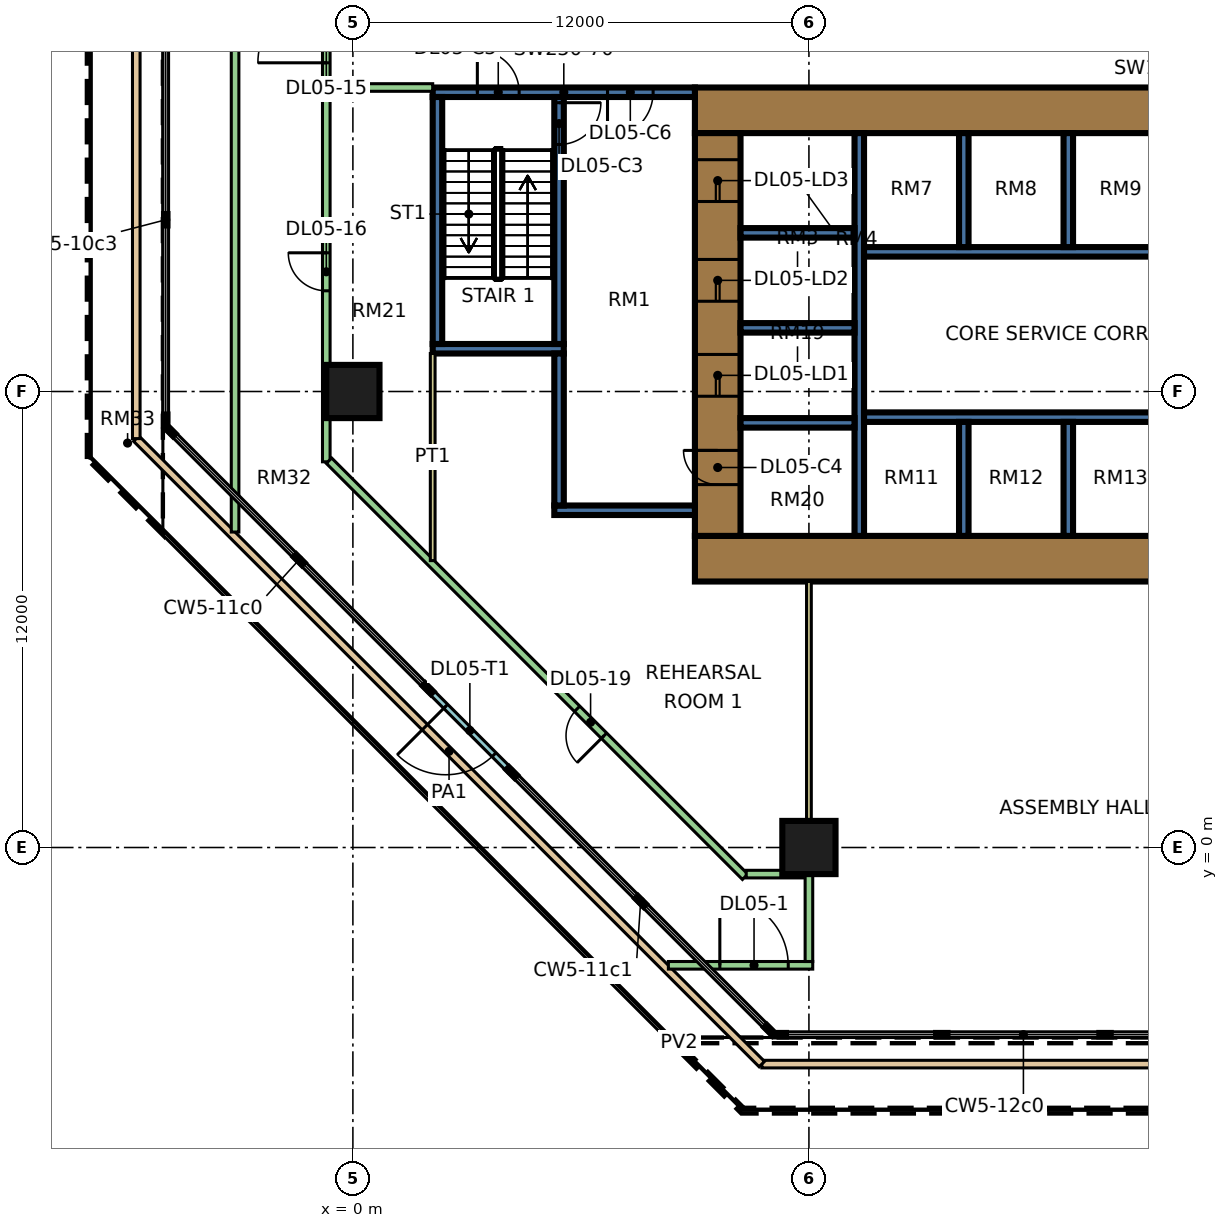
"""IFC4 building model, lengths in metres.
Left out: names, types, materials, properties, quantities, classifications, styles, units other than length and angle.
Written with IfcOpenShell. Run it as: python <this file> out.ifc"""

import sys

from ifc_helpers import new_model, si_unit, direction, frame, frame_2d, origin, origin_2d, place, context, subcontext, project, spatial, rectangle, extrude, element, fill, save


model = new_model("IFC4")
c1 = context("Model", 3, precision=1e-05, world=origin(), true_north=direction((0.0, 1.0)))
c2 = subcontext(c1, "Body", "Model", "MODEL_VIEW")
j1 = project(units=[si_unit("LENGTHUNIT", "METRE"), si_unit("PLANEANGLEUNIT", "RADIAN")], contexts=[c1])
p1 = place(None, origin())
s1 = spatial("IfcSite", under=j1, at=p1, CompositionType="ELEMENT")
p2 = place(p1, origin())
s2 = spatial("IfcBuilding", under=s1, at=p2, CompositionType="ELEMENT")
p3 = place(p2, frame((0.0, 0.0, 26.4)))
s3 = spatial("IfcBuildingStorey", under=s2, at=p3, CompositionType="ELEMENT", Elevation=26.4)
for number, where, z_axis, x_axis in (
    (1, (12.0, 0.0, 0.0), (0.0, 0.0, 1.0), (1.0, 0.0, 0.0)),
    (2, (0.0, 12.0, 0.0), (0.0, 0.0, 1.0), (1.0, 0.0, 0.0)),
):
    element("IfcColumn", number, at=place(p3, frame(where, z_axis=z_axis, x_axis=x_axis)), inside=s3, PredefinedType="COLUMN", context=c2, shape_type="SweptSolid", body=[
        extrude(rectangle(XDim=1.4, YDim=1.4, at=origin_2d()), origin(), (0.0, 0.0, 1.0), 9.0),
    ])
p4 = place(p3, frame((9.0, 7.6, 0.0), z_axis=(0.0, 0.0, 1.0), x_axis=(1.0, 0.0, 0.0)))
e3 = element("IfcWall", 3, at=p4, inside=s3, PredefinedType="SHEAR", context=c2, shape_type="SweptSolid", body=[
    extrude(rectangle(XDim=25.0, YDim=1.2, at=frame_2d((12.5, 0.0))), origin(), (0.0, 0.0, 1.0), 9.0),
])
p5 = place(p3, frame((9.0, 19.4, 0.0), z_axis=(0.0, 0.0, 1.0), x_axis=(1.0, 0.0, 0.0)))
e4 = element("IfcWall", 4, at=p5, inside=s3, PredefinedType="SHEAR", context=c2, shape_type="SweptSolid", body=[
    extrude(rectangle(XDim=25.0, YDim=1.2, at=frame_2d((12.5, 0.0))), origin(), (0.0, 0.0, 1.0), 9.0),
])
p6 = place(p5, frame((19.1, 0.0, 0.0)))
e5 = element("IfcOpeningElement", 5, at=p6, cuts=e4, PredefinedType="OPENING", context=c2, shape_type="SweptSolid", body=[
    extrude(rectangle(XDim=1.8, YDim=2.4, at=frame_2d((0.9, 1.2))), frame((0.0, 0.61, 0.0), z_axis=(0.0, -1.0, 0.0), x_axis=(1.0, 0.0, 0.0)), (0.0, 0.0, 1.0), 1.22),
])
p7 = place(p3, frame((9.6, 8.2, 0.0), z_axis=(0.0, 0.0, 1.0), x_axis=(0.0, 1.0, 0.0)))
e6 = element("IfcWall", 6, at=p7, inside=s3, PredefinedType="SHEAR", context=c2, shape_type="SweptSolid", body=[
    extrude(rectangle(XDim=10.6, YDim=1.2, at=frame_2d((5.3, 0.0))), origin(), (0.0, 0.0, 1.0), 9.0),
])
p8 = place(p7, frame((3.675, 0.0, 0.0)))
e7 = element("IfcOpeningElement", 7, at=p8, cuts=e6, PredefinedType="OPENING", context=c2, shape_type="SweptSolid", body=[
    extrude(rectangle(XDim=1.1, YDim=2.2, at=frame_2d((0.55, 1.1))), frame((0.0, 0.61, 0.0), z_axis=(0.0, -1.0, 0.0), x_axis=(1.0, 0.0, 0.0)), (0.0, 0.0, 1.0), 1.22),
])
p9 = place(p7, frame((6.175, 0.0, 0.0)))
e8 = element("IfcOpeningElement", 8, at=p9, cuts=e6, PredefinedType="OPENING", context=c2, shape_type="SweptSolid", body=[
    extrude(rectangle(XDim=1.1, YDim=2.2, at=frame_2d((0.55, 1.1))), frame((0.0, 0.61, 0.0), z_axis=(0.0, -1.0, 0.0), x_axis=(1.0, 0.0, 0.0)), (0.0, 0.0, 1.0), 1.22),
])
p10 = place(p7, frame((8.8, 0.0, 0.0)))
e9 = element("IfcOpeningElement", 9, at=p10, cuts=e6, PredefinedType="OPENING", context=c2, shape_type="SweptSolid", body=[
    extrude(rectangle(XDim=1.1, YDim=2.2, at=frame_2d((0.55, 1.1))), frame((0.0, 0.61, 0.0), z_axis=(0.0, -1.0, 0.0), x_axis=(1.0, 0.0, 0.0)), (0.0, 0.0, 1.0), 1.22),
])
p11 = place(p7, frame((1.35, 0.0, 0.0)))
e10 = element("IfcOpeningElement", 10, at=p11, cuts=e6, PredefinedType="OPENING", context=c2, shape_type="SweptSolid", body=[
    extrude(rectangle(XDim=0.9, YDim=2.1, at=frame_2d((0.45, 1.05))), frame((0.0, 0.61, 0.0), z_axis=(0.0, -1.0, 0.0), x_axis=(1.0, 0.0, 0.0)), (0.0, 0.0, 1.0), 1.22),
])
p12 = place(p3, frame((13.325, 8.2, 0.0), z_axis=(0.0, 0.0, 1.0), x_axis=(0.0, 1.0, 0.0)))
e11 = element("IfcWall", 11, at=p12, inside=s3, PredefinedType="SHEAR", context=c2, shape_type="SweptSolid", body=[
    extrude(rectangle(XDim=10.6, YDim=0.25, at=frame_2d((5.3, 0.0))), origin(), (0.0, 0.0, 1.0), 9.0),
])
p13 = place(p3, frame((13.45, 11.325, 0.0), z_axis=(0.0, 0.0, 1.0), x_axis=(1.0, 0.0, 0.0)))
e12 = element("IfcWall", 12, at=p13, inside=s3, PredefinedType="SHEAR", context=c2, shape_type="SweptSolid", body=[
    extrude(rectangle(XDim=19.35, YDim=0.25, at=frame_2d((9.675, 0.0))), origin(), (0.0, 0.0, 1.0), 9.0),
])
p14 = place(p3, frame((13.45, 15.675, 0.0), z_axis=(0.0, 0.0, 1.0), x_axis=(1.0, 0.0, 0.0)))
e13 = element("IfcWall", 13, at=p14, inside=s3, PredefinedType="SHEAR", context=c2, shape_type="SweptSolid", body=[
    extrude(rectangle(XDim=13.75, YDim=0.25, at=frame_2d((6.875, 0.0))), origin(), (0.0, 0.0, 1.0), 9.0),
])
for number, where, z_axis, x_axis in (
    (14, (10.2, 11.175, 0.0), (0.0, 0.0, 1.0), (1.0, 0.0, 0.0)),
    (15, (10.2, 13.675, 0.0), (0.0, 0.0, 1.0), (1.0, 0.0, 0.0)),
    (16, (10.2, 16.175, 0.0), (0.0, 0.0, 1.0), (1.0, 0.0, 0.0)),
    (17, (16.075, 8.2, 0.0), (0.0, 0.0, 1.0), (0.0, 1.0, 0.0)),
    (18, (18.825, 8.2, 0.0), (0.0, 0.0, 1.0), (0.0, 1.0, 0.0)),
    (19, (16.075, 15.8, 0.0), (0.0, 0.0, 1.0), (0.0, 1.0, 0.0)),
    (20, (18.825, 15.8, 0.0), (0.0, 0.0, 1.0), (0.0, 1.0, 0.0)),
):
    element("IfcWall", number, at=place(p3, frame(where, z_axis=z_axis, x_axis=x_axis)), inside=s3, PredefinedType="SHEAR", context=c2, shape_type="SweptSolid", body=[
        extrude(rectangle(XDim=3.0, YDim=0.25, at=frame_2d((1.5, 0.0))), origin(), (0.0, 0.0, 1.0), 9.0),
    ])
p15 = place(p3, frame((2.1, 19.875, 0.0), z_axis=(0.0, 0.0, 1.0), x_axis=(1.0, 0.0, 0.0)))
e21 = element("IfcWall", 21, at=p15, inside=s3, PredefinedType="SHEAR", context=c2, shape_type="SweptSolid", body=[
    extrude(rectangle(XDim=6.9, YDim=0.25, at=frame_2d((3.45, 0.0))), origin(), (0.0, 0.0, 1.0), 9.0),
])
p16 = place(p15, frame((1.175, 0.0, 0.0)))
e22 = element("IfcOpeningElement", 22, at=p16, cuts=e21, PredefinedType="OPENING", context=c2, shape_type="SweptSolid", body=[
    extrude(rectangle(XDim=1.1, YDim=2.2, at=frame_2d((0.55, 1.1))), frame((0.0, 0.135, 0.0), z_axis=(0.0, -1.0, 0.0), x_axis=(1.0, 0.0, 0.0)), (0.0, 0.0, 1.0), 0.27),
])
p17 = place(p15, frame((4.6, 0.0, 0.0)))
e23 = element("IfcOpeningElement", 23, at=p17, cuts=e21, PredefinedType="OPENING", context=c2, shape_type="SweptSolid", body=[
    extrude(rectangle(XDim=1.2, YDim=2.2, at=frame_2d((0.6, 1.1))), frame((0.0, 0.135, 0.0), z_axis=(0.0, -1.0, 0.0), x_axis=(1.0, 0.0, 0.0)), (0.0, 0.0, 1.0), 0.27),
])
p18 = place(p3, frame((2.1, 13.125, 0.0), z_axis=(0.0, 0.0, 1.0), x_axis=(1.0, 0.0, 0.0)))
e24 = element("IfcWall", 24, at=p18, inside=s3, PredefinedType="SHEAR", context=c2, shape_type="SweptSolid", body=[
    extrude(rectangle(XDim=3.45, YDim=0.25, at=frame_2d((1.725, 0.0))), origin(), (0.0, 0.0, 1.0), 9.0),
])
p19 = place(p3, frame((2.225, 13.25, 0.0), z_axis=(0.0, 0.0, 1.0), x_axis=(0.0, 1.0, 0.0)))
e25 = element("IfcWall", 25, at=p19, inside=s3, PredefinedType="SHEAR", context=c2, shape_type="SweptSolid", body=[
    extrude(rectangle(XDim=6.5, YDim=0.25, at=frame_2d((3.25, 0.0))), origin(), (0.0, 0.0, 1.0), 9.0),
])
p20 = place(p3, frame((5.425, 13.25, 0.0), z_axis=(0.0, 0.0, 1.0), x_axis=(0.0, 1.0, 0.0)))
e26 = element("IfcWall", 26, at=p20, inside=s3, PredefinedType="SHEAR", context=c2, shape_type="SweptSolid", body=[
    extrude(rectangle(XDim=6.5, YDim=0.25, at=frame_2d((3.25, 0.0))), origin(), (0.0, 0.0, 1.0), 9.0),
])
p21 = place(p20, frame((5.25, 0.0, 0.0)))
e27 = element("IfcOpeningElement", 27, at=p21, cuts=e26, PredefinedType="OPENING", context=c2, shape_type="SweptSolid", body=[
    extrude(rectangle(XDim=1.1, YDim=2.2, at=frame_2d((0.55, 1.1))), frame((0.0, 0.135, 0.0), z_axis=(0.0, -1.0, 0.0), x_axis=(1.0, 0.0, 0.0)), (0.0, 0.0, 1.0), 0.27),
])
p22 = place(p3, frame((5.3, 8.875, 0.0), z_axis=(0.0, 0.0, 1.0), x_axis=(1.0, 0.0, 0.0)))
e28 = element("IfcWall", 28, at=p22, inside=s3, PredefinedType="SHEAR", context=c2, shape_type="SweptSolid", body=[
    extrude(rectangle(XDim=3.7, YDim=0.25, at=frame_2d((1.85, 0.0))), origin(), (0.0, 0.0, 1.0), 9.0),
])
p23 = place(p3, frame((5.425, 9.0, 0.0), z_axis=(0.0, 0.0, 1.0), x_axis=(0.0, 1.0, 0.0)))
e29 = element("IfcWall", 29, at=p23, inside=s3, PredefinedType="SHEAR", context=c2, shape_type="SweptSolid", body=[
    extrude(rectangle(XDim=4.0, YDim=0.25, at=frame_2d((2.0, 0.0))), origin(), (0.0, 0.0, 1.0), 9.0),
])
p24 = place(p3, frame((2.018, 4.139, 0.0), z_axis=(0.0, 0.0, 1.0), x_axis=(0.707106781187, -0.707106781187, 0.0)))
e30 = element("IfcWall", 30, at=p24, inside=s3, PredefinedType="SOLIDWALL", context=c2, shape_type="SweptSolid", body=[
    extrude(rectangle(XDim=3.0, YDim=0.15, at=frame_2d((1.5, 0.0))), origin(), (0.0, 0.0, 1.0), 8.45),
])
p25 = place(p24, frame((0.6, 0.0, 0.0)))
e31 = element("IfcOpeningElement", 31, at=p25, cuts=e30, PredefinedType="OPENING", context=c2, shape_type="SweptSolid", body=[
    extrude(rectangle(XDim=1.8, YDim=2.4, at=frame_2d((0.9, 1.2))), frame((0.0, 0.085, 0.0), z_axis=(0.0, -1.0, 0.0), x_axis=(1.0, 0.0, 0.0)), (0.0, 0.0, 1.0), 0.17),
])
p26 = place(p3, frame((72.24, -5.7, 0.0), z_axis=(0.0, 0.0, 1.0), x_axis=(-1.0, 0.0, 0.0)))
e32 = element("IfcWall", 32, at=p26, inside=s3, PredefinedType="PARAPET", context=c2, shape_type="SweptSolid", body=[
    extrude(rectangle(XDim=61.479, YDim=0.2, at=frame_2d((30.74, 0.0))), origin(), (0.0, 0.0, 1.0), 0.5),
])
p27 = place(p3, frame((10.76, -5.7, 0.0), z_axis=(0.0, 0.0, 1.0), x_axis=(-0.707106781187, 0.707106781187, 0.0)))
e33 = element("IfcWall", 33, at=p27, inside=s3, PredefinedType="PARAPET", context=c2, shape_type="SweptSolid", body=[
    extrude(rectangle(XDim=23.278, YDim=0.2, at=frame_2d((11.639, 0.0))), origin(), (0.0, 0.0, 1.0), 0.5),
])
p28 = place(p3, frame((-5.7, 10.76, 0.0), z_axis=(0.0, 0.0, 1.0), x_axis=(0.0, 1.0, 0.0)))
e34 = element("IfcWall", 34, at=p28, inside=s3, PredefinedType="PARAPET", context=c2, shape_type="SweptSolid", body=[
    extrude(rectangle(XDim=52.479, YDim=0.2, at=frame_2d((26.24, 0.0))), origin(), (0.0, 0.0, 1.0), 0.5),
])
p29 = place(p3, frame((-3.1, 8.302, 0.0), z_axis=(0.0, 0.0, 1.0), x_axis=(0.0, 1.0, 0.0)))
e35 = element("IfcWall", 35, at=p29, inside=s3, PredefinedType="PARTITIONING", context=c2, shape_type="SweptSolid", body=[
    extrude(rectangle(XDim=56.331, YDim=0.2, at=frame_2d((28.166, 0.0))), origin(), (0.0, 0.0, 1.0), 8.45),
])
p30 = place(p29, frame((29.431, 0.0, 0.0)))
e36 = element("IfcOpeningElement", 36, at=p30, cuts=e35, PredefinedType="OPENING", context=c2, shape_type="SweptSolid", body=[
    extrude(rectangle(XDim=1.0, YDim=2.1, at=frame_2d((0.5, 1.05))), frame((0.0, 0.11, 0.0), z_axis=(0.0, -1.0, 0.0), x_axis=(1.0, 0.0, 0.0)), (0.0, 0.0, 1.0), 0.22),
])
p31 = place(p29, frame((55.181, 0.0, 0.0)))
e37 = element("IfcOpeningElement", 37, at=p31, cuts=e35, PredefinedType="OPENING", context=c2, shape_type="SweptSolid", body=[
    extrude(rectangle(XDim=1.0, YDim=2.1, at=frame_2d((0.5, 1.05))), frame((0.0, 0.11, 0.0), z_axis=(0.0, -1.0, 0.0), x_axis=(1.0, 0.0, 0.0)), (0.0, 0.0, 1.0), 0.22),
])
p32 = place(p3, frame((-0.7, 10.15, 0.0), z_axis=(0.0, 0.0, 1.0), x_axis=(0.0, 1.0, 0.0)))
e38 = element("IfcWall", 38, at=p32, inside=s3, PredefinedType="PARTITIONING", context=c2, shape_type="SweptSolid", body=[
    extrude(rectangle(XDim=15.85, YDim=0.2, at=frame_2d((7.925, 0.0))), origin(), (0.0, 0.0, 1.0), 8.45),
])
p33 = place(p32, frame((10.5, 0.0, 0.0)))
e39 = element("IfcOpeningElement", 39, at=p33, cuts=e38, PredefinedType="OPENING", context=c2, shape_type="SweptSolid", body=[
    extrude(rectangle(XDim=1.8, YDim=2.1, at=frame_2d((0.9, 1.05))), frame((0.0, 0.11, 0.0), z_axis=(0.0, -1.0, 0.0), x_axis=(1.0, 0.0, 0.0)), (0.0, 0.0, 1.0), 0.22),
])
p34 = place(p32, frame((4.5, 0.0, 0.0)))
e40 = element("IfcOpeningElement", 40, at=p34, cuts=e38, PredefinedType="OPENING", context=c2, shape_type="SweptSolid", body=[
    extrude(rectangle(XDim=1.0, YDim=2.1, at=frame_2d((0.5, 1.05))), frame((0.0, 0.11, 0.0), z_axis=(0.0, -1.0, 0.0), x_axis=(1.0, 0.0, 0.0)), (0.0, 0.0, 1.0), 0.22),
])
p35 = place(p3, frame((-0.629, 10.179, 0.0), z_axis=(0.0, 0.0, 1.0), x_axis=(0.707106781187, -0.707106781187, 0.0)))
e41 = element("IfcWall", 41, at=p35, inside=s3, PredefinedType="PARTITIONING", context=c2, shape_type="SweptSolid", body=[
    extrude(rectangle(XDim=15.486, YDim=0.2, at=frame_2d((7.743, 0.0))), origin(), (0.0, 0.0, 1.0), 8.45),
])
p36 = place(p35, frame((9.235, 0.0, 0.0)))
e42 = element("IfcOpeningElement", 42, at=p36, cuts=e41, PredefinedType="OPENING", context=c2, shape_type="SweptSolid", body=[
    extrude(rectangle(XDim=1.0, YDim=2.1, at=frame_2d((0.5, 1.05))), frame((0.0, 0.11, 0.0), z_axis=(0.0, -1.0, 0.0), x_axis=(1.0, 0.0, 0.0)), (0.0, 0.0, 1.0), 0.22),
])
p37 = place(p3, frame((-0.6, 20.0, 0.0), z_axis=(0.0, 0.0, 1.0), x_axis=(1.0, 0.0, 0.0)))
e43 = element("IfcWall", 43, at=p37, inside=s3, PredefinedType="PARTITIONING", context=c2, shape_type="SweptSolid", body=[
    extrude(rectangle(XDim=2.7, YDim=0.2, at=frame_2d((1.35, 0.0))), origin(), (0.0, 0.0, 1.0), 8.45),
])
p38 = place(p3, frame((2.1, 7.55, 0.0), z_axis=(0.0, 0.0, 1.0), x_axis=(0.0, 1.0, 0.0)))
e44 = element("IfcWall", 44, at=p38, inside=s3, PredefinedType="PARTITIONING", context=c2, shape_type="SweptSolid", body=[
    extrude(rectangle(XDim=5.45, YDim=0.125, at=frame_2d((2.725, 0.0))), origin(), (0.0, 0.0, 1.0), 8.45),
])
p39 = place(p3, frame((8.302, -3.1, 0.0), z_axis=(0.0, 0.0, 1.0), x_axis=(1.0, 0.0, 0.0)))
e45 = element("IfcWall", 45, at=p39, inside=s3, PredefinedType="PARTITIONING", context=c2, shape_type="SweptSolid", body=[
    extrude(rectangle(XDim=3.798, YDim=0.2, at=frame_2d((1.899, 0.0))), origin(), (0.0, 0.0, 1.0), 8.45),
])
p40 = place(p39, frame((1.354, 0.0, 0.0)))
e46 = element("IfcOpeningElement", 46, at=p40, cuts=e45, PredefinedType="OPENING", context=c2, shape_type="SweptSolid", body=[
    extrude(rectangle(XDim=1.8, YDim=2.1, at=frame_2d((0.9, 1.05))), frame((0.0, 0.11, 0.0), z_axis=(0.0, -1.0, 0.0), x_axis=(1.0, 0.0, 0.0)), (0.0, 0.0, 1.0), 0.22),
])
p41 = place(p3, frame((10.35, -0.7, 0.0), z_axis=(0.0, 0.0, 1.0), x_axis=(1.0, 0.0, 0.0)))
e47 = element("IfcWall", 47, at=p41, inside=s3, PredefinedType="PARTITIONING", context=c2, shape_type="SweptSolid", body=[
    extrude(rectangle(XDim=1.55, YDim=0.2, at=frame_2d((0.775, 0.0))), origin(), (0.0, 0.0, 1.0), 8.45),
])
p42 = place(p3, frame((12.0, -3.0, 0.0), z_axis=(0.0, 0.0, 1.0), x_axis=(0.0, 1.0, 0.0)))
e48 = element("IfcWall", 48, at=p42, inside=s3, PredefinedType="PARTITIONING", context=c2, shape_type="SweptSolid", body=[
    extrude(rectangle(XDim=2.3, YDim=0.2, at=frame_2d((1.15, 0.0))), origin(), (0.0, 0.0, 1.0), 8.45),
])
p43 = place(p3, frame((12.0, -0.7, 0.0), z_axis=(0.0, 0.0, 1.0), x_axis=(0.0, 1.0, 0.0)))
e49 = element("IfcWall", 49, at=p43, inside=s3, PredefinedType="PARTITIONING", context=c2, shape_type="SweptSolid", body=[
    extrude(rectangle(XDim=7.7, YDim=0.125, at=frame_2d((3.85, 0.0))), origin(), (0.0, 0.0, 1.0), 8.45),
])
p44 = place(p25, frame((1.8, 0.0, 0.0), z_axis=(0.0, 0.0, 1.0), x_axis=(-1.0, 0.0, 0.0)))
e50 = element("IfcDoor", 50, at=p44, inside=s3, OperationType="DOUBLE_DOOR_SINGLE_SWING", PredefinedType="DOOR", context=c2, shape_type="SweptSolid", body=[
    extrude(rectangle(XDim=1.8, YDim=2.4, at=frame_2d((0.9, 1.2))), frame((0.0, 0.025, 0.0), z_axis=(0.0, -1.0, 0.0), x_axis=(1.0, 0.0, 0.0)), (0.0, 0.0, 1.0), 0.05),
])
fill(e31, e50)
p45 = place(p8, origin())
e51 = element("IfcDoor", 51, at=p45, inside=s3, OperationType="DOUBLE_DOOR_SLIDING", PredefinedType="DOOR", context=c2, shape_type="SweptSolid", body=[
    extrude(rectangle(XDim=1.1, YDim=2.2, at=frame_2d((0.55, 1.1))), frame((0.0, 0.025, 0.0), z_axis=(0.0, -1.0, 0.0), x_axis=(1.0, 0.0, 0.0)), (0.0, 0.0, 1.0), 0.05),
])
fill(e7, e51)
p46 = place(p9, origin())
e52 = element("IfcDoor", 52, at=p46, inside=s3, OperationType="DOUBLE_DOOR_SLIDING", PredefinedType="DOOR", context=c2, shape_type="SweptSolid", body=[
    extrude(rectangle(XDim=1.1, YDim=2.2, at=frame_2d((0.55, 1.1))), frame((0.0, 0.025, 0.0), z_axis=(0.0, -1.0, 0.0), x_axis=(1.0, 0.0, 0.0)), (0.0, 0.0, 1.0), 0.05),
])
fill(e8, e52)
p47 = place(p10, origin())
e53 = element("IfcDoor", 53, at=p47, inside=s3, OperationType="DOUBLE_DOOR_SLIDING", PredefinedType="DOOR", context=c2, shape_type="SweptSolid", body=[
    extrude(rectangle(XDim=1.1, YDim=2.2, at=frame_2d((0.55, 1.1))), frame((0.0, 0.025, 0.0), z_axis=(0.0, -1.0, 0.0), x_axis=(1.0, 0.0, 0.0)), (0.0, 0.0, 1.0), 0.05),
])
fill(e9, e53)
p48 = place(p21, origin())
e54 = element("IfcDoor", 54, at=p48, inside=s3, OperationType="SINGLE_SWING_RIGHT", PredefinedType="DOOR", context=c2, shape_type="SweptSolid", body=[
    extrude(rectangle(XDim=1.1, YDim=2.2, at=frame_2d((0.55, 1.1))), frame((0.0, 0.025, 0.0), z_axis=(0.0, -1.0, 0.0), x_axis=(1.0, 0.0, 0.0)), (0.0, 0.0, 1.0), 0.05),
])
fill(e27, e54)
p49 = place(p11, frame((0.9, 0.0, 0.0), z_axis=(0.0, 0.0, 1.0), x_axis=(-1.0, 0.0, 0.0)))
e55 = element("IfcDoor", 55, at=p49, inside=s3, OperationType="SINGLE_SWING_RIGHT", PredefinedType="DOOR", context=c2, shape_type="SweptSolid", body=[
    extrude(rectangle(XDim=0.9, YDim=2.1, at=frame_2d((0.45, 1.05))), frame((0.0, 0.025, 0.0), z_axis=(0.0, -1.0, 0.0), x_axis=(1.0, 0.0, 0.0)), (0.0, 0.0, 1.0), 0.05),
])
fill(e10, e55)
p50 = place(p16, origin())
e56 = element("IfcDoor", 56, at=p50, inside=s3, OperationType="SINGLE_SWING_LEFT", PredefinedType="DOOR", context=c2, shape_type="SweptSolid", body=[
    extrude(rectangle(XDim=1.1, YDim=2.2, at=frame_2d((0.55, 1.1))), frame((0.0, 0.025, 0.0), z_axis=(0.0, -1.0, 0.0), x_axis=(1.0, 0.0, 0.0)), (0.0, 0.0, 1.0), 0.05),
])
fill(e22, e56)
p51 = place(p17, frame((1.2, 0.0, 0.0), z_axis=(0.0, 0.0, 1.0), x_axis=(-1.0, 0.0, 0.0)))
e57 = element("IfcDoor", 57, at=p51, inside=s3, OperationType="SINGLE_SWING_LEFT", PredefinedType="DOOR", context=c2, shape_type="SweptSolid", body=[
    extrude(rectangle(XDim=1.2, YDim=2.2, at=frame_2d((0.6, 1.1))), frame((0.0, 0.025, 0.0), z_axis=(0.0, -1.0, 0.0), x_axis=(1.0, 0.0, 0.0)), (0.0, 0.0, 1.0), 0.05),
])
fill(e23, e57)
p52 = place(p40, origin())
e58 = element("IfcDoor", 58, at=p52, inside=s3, OperationType="DOUBLE_DOOR_SINGLE_SWING", PredefinedType="DOOR", context=c2, shape_type="SweptSolid", body=[
    extrude(rectangle(XDim=1.8, YDim=2.1, at=frame_2d((0.9, 1.05))), frame((0.0, 0.025, 0.0), z_axis=(0.0, -1.0, 0.0), x_axis=(1.0, 0.0, 0.0)), (0.0, 0.0, 1.0), 0.05),
])
fill(e46, e58)
p53 = place(p33, origin())
e59 = element("IfcDoor", 59, at=p53, inside=s3, OperationType="DOUBLE_DOOR_SINGLE_SWING", PredefinedType="DOOR", context=c2, shape_type="SweptSolid", body=[
    extrude(rectangle(XDim=1.8, YDim=2.1, at=frame_2d((0.9, 1.05))), frame((0.0, 0.025, 0.0), z_axis=(0.0, -1.0, 0.0), x_axis=(1.0, 0.0, 0.0)), (0.0, 0.0, 1.0), 0.05),
])
fill(e39, e59)
p54 = place(p34, frame((1.0, 0.0, 0.0), z_axis=(0.0, 0.0, 1.0), x_axis=(-1.0, 0.0, 0.0)))
e60 = element("IfcDoor", 60, at=p54, inside=s3, OperationType="SINGLE_SWING_RIGHT", PredefinedType="DOOR", context=c2, shape_type="SweptSolid", body=[
    extrude(rectangle(XDim=1.0, YDim=2.1, at=frame_2d((0.5, 1.05))), frame((0.0, 0.025, 0.0), z_axis=(0.0, -1.0, 0.0), x_axis=(1.0, 0.0, 0.0)), (0.0, 0.0, 1.0), 0.05),
])
fill(e40, e60)
p55 = place(p36, origin())
e61 = element("IfcDoor", 61, at=p55, inside=s3, OperationType="SINGLE_SWING_RIGHT", PredefinedType="DOOR", context=c2, shape_type="SweptSolid", body=[
    extrude(rectangle(XDim=1.0, YDim=2.1, at=frame_2d((0.5, 1.05))), frame((0.0, 0.025, 0.0), z_axis=(0.0, -1.0, 0.0), x_axis=(1.0, 0.0, 0.0)), (0.0, 0.0, 1.0), 0.05),
])
fill(e42, e61)
save(model, sys.argv[1])
